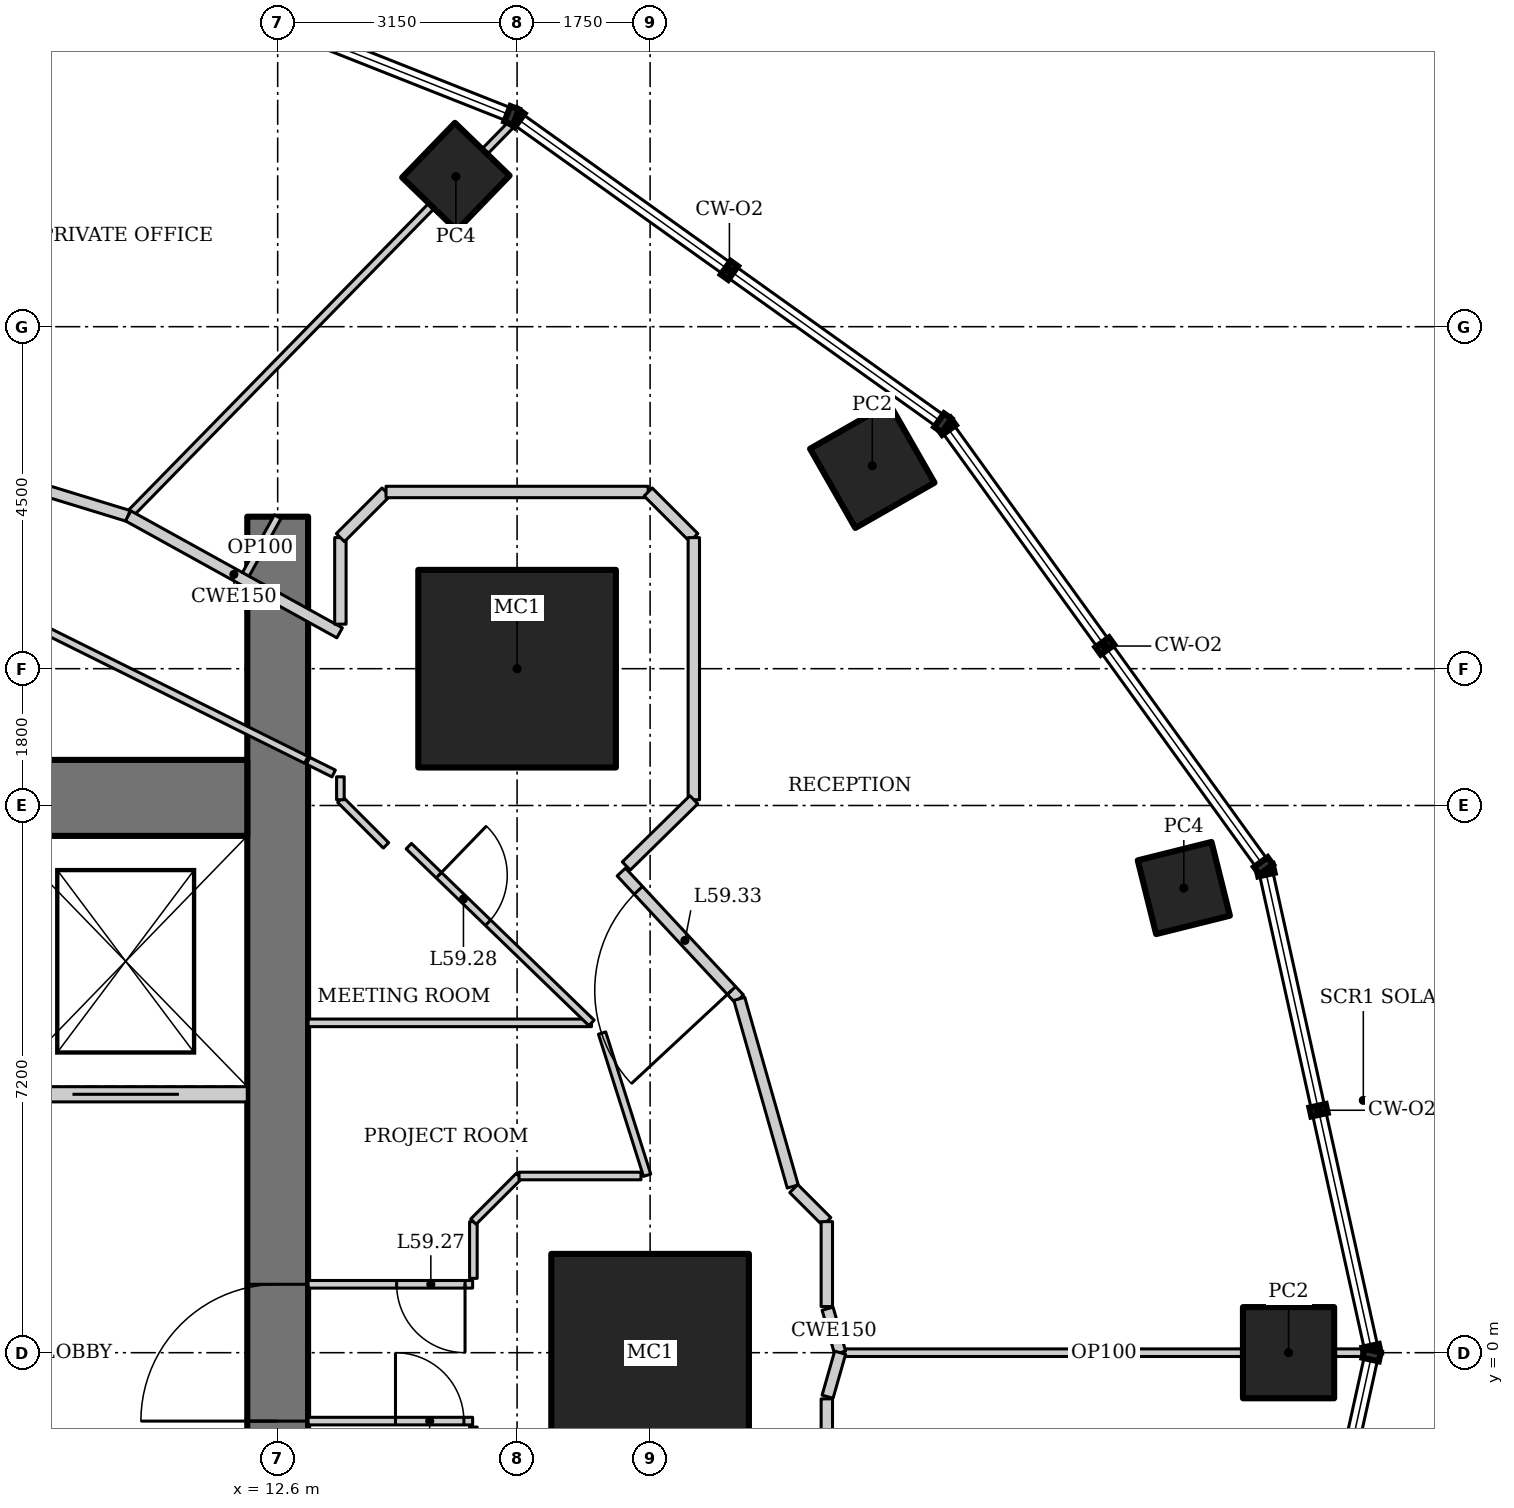
"""IFC4 building model, lengths in metres.
Left out: names, types, materials, properties, quantities, classifications, styles, units other than length and angle.
Written with IfcOpenShell. Run it as: python <this file> out.ifc"""

import sys

from ifc_helpers import new_model, si_unit, direction, frame, frame_2d, origin, origin_2d, place, context, subcontext, project, spatial, rectangle, hollow_rectangle, extrude, element, fill, save


model = new_model("IFC4")
c1 = context("Model", 3, precision=1e-05, world=origin(), true_north=direction((0.0, 1.0)))
c2 = subcontext(c1, "Body", "Model", "MODEL_VIEW")
j1 = project(units=[si_unit("LENGTHUNIT", "METRE"), si_unit("PLANEANGLEUNIT", "RADIAN")], contexts=[c1])
p1 = place(None, origin())
s1 = spatial("IfcSite", under=j1, at=p1, CompositionType="ELEMENT")
p2 = place(p1, origin())
s2 = spatial("IfcBuilding", under=s1, at=p2, CompositionType="ELEMENT")
p3 = place(p2, frame((0.0, 0.0, 253.6)))
s3 = spatial("IfcBuildingStorey", under=s2, at=p3, CompositionType="ELEMENT", Elevation=253.6)
for number, where, z_axis, x_axis in (
    (1, (17.5, 0.0, 0.0), (0.0, 0.0, 1.0), (1.0, 0.0, 0.0)),
    (2, (15.75, 9.0, 0.0), (0.0, 0.0, 1.0), (1.0, 0.0, 0.0)),
):
    element("IfcColumn", number, at=place(p3, frame(where, z_axis=z_axis, x_axis=x_axis)), inside=s3, PredefinedType="COLUMN", context=c2, shape_type="SweptSolid", body=[
        extrude(hollow_rectangle(XDim=2.6, YDim=2.6, WallThickness=0.13, at=origin_2d()), origin(), (0.0, 0.0, 1.0), 4.2),
    ])
p4 = place(p3, frame((25.9, 0.0, 0.0), z_axis=(0.0, 0.0, 1.0), x_axis=(1.0, 0.0, 0.0)))
e3 = element("IfcColumn", 3, at=p4, inside=s3, PredefinedType="COLUMN", context=c2, shape_type="SweptSolid", body=[
    extrude(hollow_rectangle(XDim=1.2, YDim=1.2, WallThickness=0.1, at=origin_2d()), origin(), (0.0, 0.0, 1.0), 4.2),
])
p5 = place(p3, frame((24.522, 6.114, 0.0), z_axis=(0.0, 0.0, 1.0), x_axis=(0.970295726276, 0.2419218956, 0.0)))
e4 = element("IfcColumn", 4, at=p5, inside=s3, PredefinedType="COLUMN", context=c2, shape_type="SweptSolid", body=[
    extrude(hollow_rectangle(XDim=1.0, YDim=1.0, WallThickness=0.08, at=origin_2d()), origin(), (0.0, 0.0, 1.0), 4.2),
])
p6 = place(p3, frame((20.423, 11.67, 0.0), z_axis=(0.0, 0.0, 1.0), x_axis=(0.86824298017, 0.496139221777, 0.0)))
e5 = element("IfcColumn", 5, at=p6, inside=s3, PredefinedType="COLUMN", context=c2, shape_type="SweptSolid", body=[
    extrude(hollow_rectangle(XDim=1.2, YDim=1.2, WallThickness=0.1, at=origin_2d()), origin(), (0.0, 0.0, 1.0), 4.2),
])
for number, where, z_axis, x_axis in (
    (6, (14.944, 15.475, 0.0), (0.0, 0.0, 1.0), (0.695, 0.719, 0.0)),
    (7, (9.035, 17.731, 0.0), (0.0, 0.0, 1.0), (0.454, 0.891, 0.0)),
):
    element("IfcColumn", number, at=place(p3, frame(where, z_axis=z_axis, x_axis=x_axis)), inside=s3, PredefinedType="COLUMN", context=c2, shape_type="SweptSolid", body=[
        extrude(hollow_rectangle(XDim=1.0, YDim=1.0, WallThickness=0.08, at=origin_2d()), origin(), (0.0, 0.0, 1.0), 4.2),
    ])
p7 = place(p3, frame((12.6, -11.0, 0.0), z_axis=(0.0, 0.0, 1.0), x_axis=(0.0, 1.0, 0.0)))
e8 = element("IfcWall", 8, at=p7, inside=s3, PredefinedType="SHEAR", context=c2, shape_type="SweptSolid", body=[
    extrude(rectangle(XDim=22.0, YDim=0.8, at=frame_2d((11.0, 0.0))), origin(), (0.0, 0.0, 1.0), 4.2),
])
p8 = place(p7, frame((10.1, 0.0, 0.0)))
e9 = element("IfcOpeningElement", 9, at=p8, cuts=e8, PredefinedType="OPENING", context=c2, shape_type="SweptSolid", body=[
    extrude(rectangle(XDim=1.8, YDim=2.1, at=frame_2d((0.9, 1.05))), frame((0.0, 0.41, 0.0), z_axis=(0.0, -1.0, 0.0), x_axis=(1.0, 0.0, 0.0)), (0.0, 0.0, 1.0), 0.82),
])
p9 = place(p3, frame((12.2, 7.3, 0.0), z_axis=(0.0, 0.0, 1.0), x_axis=(-1.0, 0.0, 0.0)))
e10 = element("IfcWall", 10, at=p9, inside=s3, PredefinedType="SHEAR", context=c2, shape_type="SweptSolid", body=[
    extrude(rectangle(XDim=6.6, YDim=1.0, at=frame_2d((3.3, 0.0))), origin(), (0.0, 0.0, 1.0), 4.2),
])
p10 = place(p3, frame((12.2, 3.4, 0.0), z_axis=(0.0, 0.0, 1.0), x_axis=(-1.0, 0.0, 0.0)))
e11 = element("IfcWall", 11, at=p10, inside=s3, PredefinedType="SOLIDWALL", context=c2, shape_type="SweptSolid", body=[
    extrude(rectangle(XDim=6.6, YDim=0.2, at=frame_2d((3.3, 0.0))), origin(), (0.0, 0.0, 1.0), 4.2),
])
p11 = place(p10, frame((4.45, 0.0, 0.0)))
e12 = element("IfcOpeningElement", 12, at=p11, cuts=e11, PredefinedType="OPENING", context=c2, shape_type="SweptSolid", body=[
    extrude(rectangle(XDim=1.1, YDim=2.2, at=frame_2d((0.55, 1.1))), frame((0.0, 0.11, 0.0), z_axis=(0.0, -1.0, 0.0), x_axis=(1.0, 0.0, 0.0)), (0.0, 0.0, 1.0), 0.22),
])
p12 = place(p10, frame((0.9, 0.0, 0.0)))
e13 = element("IfcOpeningElement", 13, at=p12, cuts=e11, PredefinedType="OPENING", context=c2, shape_type="SweptSolid", body=[
    extrude(rectangle(XDim=1.4, YDim=2.2, at=frame_2d((0.7, 1.1))), frame((0.0, 0.11, 0.0), z_axis=(0.0, -1.0, 0.0), x_axis=(1.0, 0.0, 0.0)), (0.0, 0.0, 1.0), 0.22),
])
p13 = place(p3, frame((26.944, 0.0, 0.0), z_axis=(0.0, 0.0, 1.0), x_axis=(-1.0, 0.0, 0.0)))
e14 = element("IfcWall", 14, at=p13, inside=s3, PredefinedType="PARTITIONING", context=c2, shape_type="SweptSolid", body=[
    extrude(rectangle(XDim=6.944, YDim=0.1, at=frame_2d((3.472, 0.0))), origin(), (0.0, 0.0, 1.0), 3.349),
])
p14 = place(p3, frame((15.709, 16.199, 0.0), z_axis=(0.0, 0.0, 1.0), x_axis=(-0.699362525935, -0.714767135029, 0.0)))
e15 = element("IfcWall", 15, at=p14, inside=s3, PredefinedType="PARTITIONING", context=c2, shape_type="SweptSolid", body=[
    extrude(rectangle(XDim=7.259, YDim=0.1, at=frame_2d((3.629, 0.0))), origin(), (0.0, 0.0, 1.0), 3.41),
])
p15 = place(p3, frame((10.633, 11.01, 0.0), z_axis=(0.0, 0.0, 1.0), x_axis=(-0.956185837153, 0.292760388079, 0.0)))
e16 = element("IfcWall", 16, at=p15, inside=s3, PredefinedType="PARTITIONING", context=c2, shape_type="SweptSolid", body=[
    extrude(rectangle(XDim=4.544, YDim=0.15, at=frame_2d((2.272, 0.0))), origin(), (0.0, 0.0, 1.0), 4.05),
])
p16 = place(p15, frame((3.494, 0.0, 0.0)))
e17 = element("IfcOpeningElement", 17, at=p16, cuts=e16, PredefinedType="OPENING", context=c2, shape_type="SweptSolid", body=[
    extrude(rectangle(XDim=0.9, YDim=2.1, at=frame_2d((0.45, 1.05))), frame((0.0, 0.085, 0.0), z_axis=(0.0, -1.0, 0.0), x_axis=(1.0, 0.0, 0.0)), (0.0, 0.0, 1.0), 0.17),
])
p17 = place(p3, frame((13.0, 4.34, 0.0), z_axis=(0.0, 0.0, 1.0), x_axis=(1.0, 0.0, 0.0)))
e18 = element("IfcWall", 18, at=p17, inside=s3, PredefinedType="PARTITIONING", context=c2, shape_type="SweptSolid", body=[
    extrude(rectangle(XDim=3.729, YDim=0.1, at=frame_2d((1.865, 0.0))), origin(), (0.0, 0.0, 1.0), 4.05),
])
p18 = place(p3, frame((13.0, 7.788, 0.0), z_axis=(0.0, 0.0, 1.0), x_axis=(0.895721570004, -0.444615416995, 0.0)))
e19 = element("IfcWall", 19, at=p18, inside=s3, PredefinedType="PARTITIONING", context=c2, shape_type="SweptSolid", body=[
    extrude(rectangle(XDim=0.376, YDim=0.1, at=frame_2d((0.188, 0.0))), origin(), (0.0, 0.0, 1.0), 4.05),
])
p19 = place(p3, frame((9.298, 9.628, 0.0), z_axis=(0.0, 0.0, 1.0), x_axis=(0.895529831139, -0.445001484874, 0.0)))
e20 = element("IfcWall", 20, at=p19, inside=s3, PredefinedType="PARTITIONING", context=c2, shape_type="SweptSolid", body=[
    extrude(rectangle(XDim=4.108, YDim=0.1, at=frame_2d((2.054, 0.0))), origin(), (0.0, 0.0, 1.0), 4.05),
])
p20 = place(p3, frame((12.6, 11.0, 0.0), z_axis=(0.0, 0.0, 1.0), x_axis=(-0.484103558985, -0.875010710893, 0.0)))
e21 = element("IfcWall", 21, at=p20, inside=s3, PredefinedType="PARTITIONING", context=c2, shape_type="SweptSolid", body=[
    extrude(rectangle(XDim=0.943, YDim=0.1, at=frame_2d((0.472, 0.0))), origin(), (0.0, 0.0, 1.0), 4.05),
])
p21 = place(p3, frame((18.673, 4.656, 0.0), z_axis=(0.0, 0.0, 1.0), x_axis=(-0.680985069419, 0.732297299755, 0.0)))
e22 = element("IfcWall", 22, at=p21, inside=s3, PredefinedType="PARTITIONING", context=c2, shape_type="SweptSolid", body=[
    extrude(rectangle(XDim=2.279, YDim=0.15, at=frame_2d((1.14, 0.0))), origin(), (0.0, 0.0, 1.0), 4.05),
])
p22 = place(p21, frame((0.15, 0.0, 0.0)))
e23 = element("IfcOpeningElement", 23, at=p22, cuts=e22, PredefinedType="OPENING", context=c2, shape_type="SweptSolid", body=[
    extrude(rectangle(XDim=1.8, YDim=2.1, at=frame_2d((0.9, 1.05))), frame((0.0, 0.085, 0.0), z_axis=(0.0, -1.0, 0.0), x_axis=(1.0, 0.0, 0.0)), (0.0, 0.0, 1.0), 0.17),
])
p23 = place(p3, frame((13.415, 9.472, 0.0), z_axis=(0.0, 0.0, 1.0), x_axis=(-0.875072100837, 0.483992580869, 0.0)))
e24 = element("IfcWall", 24, at=p23, inside=s3, PredefinedType="PARTITIONING", context=c2, shape_type="SweptSolid", body=[
    extrude(rectangle(XDim=3.179, YDim=0.15, at=frame_2d((1.59, 0.0))), origin(), (0.0, 0.0, 1.0), 4.05),
])
p24 = place(p3, frame((14.325, 6.665, 0.0), z_axis=(0.0, 0.0, 1.0), x_axis=(0.718798647558, -0.695218314107, 0.0)))
e25 = element("IfcWall", 25, at=p24, inside=s3, PredefinedType="PARTITIONING", context=c2, shape_type="SweptSolid", body=[
    extrude(rectangle(XDim=3.344, YDim=0.1, at=frame_2d((1.672, 0.0))), origin(), (0.0, 0.0, 1.0), 4.05),
])
p25 = place(p24, frame((0.55, 0.0, 0.0)))
e26 = element("IfcOpeningElement", 26, at=p25, cuts=e25, PredefinedType="OPENING", context=c2, shape_type="SweptSolid", body=[
    extrude(rectangle(XDim=0.9, YDim=2.1, at=frame_2d((0.45, 1.05))), frame((0.0, 0.06, 0.0), z_axis=(0.0, -1.0, 0.0), x_axis=(1.0, 0.0, 0.0)), (0.0, 0.0, 1.0), 0.12),
])
p26 = place(p3, frame((14.025, 6.675, 0.0), z_axis=(0.0, 0.0, 1.0), x_axis=(-0.707106781187, 0.707106781187, 0.0)))
e27 = element("IfcWall", 27, at=p26, inside=s3, PredefinedType="PARTITIONING", context=c2, shape_type="SweptSolid", body=[
    extrude(rectangle(XDim=0.849, YDim=0.1, at=frame_2d((0.425, 0.0))), origin(), (0.0, 0.0, 1.0), 4.05),
])
p27 = place(p3, frame((13.425, 7.275, 0.0), z_axis=(0.0, 0.0, 1.0), x_axis=(0.0, 1.0, 0.0)))
e28 = element("IfcWall", 28, at=p27, inside=s3, PredefinedType="PARTITIONING", context=c2, shape_type="SweptSolid", body=[
    extrude(rectangle(XDim=0.302, YDim=0.1, at=frame_2d((0.151, 0.0))), origin(), (0.0, 0.0, 1.0), 4.05),
])
p28 = place(p3, frame((13.425, 9.586, 0.0), z_axis=(0.0, 0.0, 1.0), x_axis=(0.0, 1.0, 0.0)))
e29 = element("IfcWall", 29, at=p28, inside=s3, PredefinedType="PARTITIONING", context=c2, shape_type="SweptSolid", body=[
    extrude(rectangle(XDim=1.138, YDim=0.15, at=frame_2d((0.569, 0.0))), origin(), (0.0, 0.0, 1.0), 4.05),
])
p29 = place(p3, frame((13.425, 10.725, 0.0), z_axis=(0.0, 0.0, 1.0), x_axis=(0.707106781187, 0.707106781187, 0.0)))
e30 = element("IfcWall", 30, at=p29, inside=s3, PredefinedType="PARTITIONING", context=c2, shape_type="SweptSolid", body=[
    extrude(rectangle(XDim=0.849, YDim=0.15, at=frame_2d((0.425, 0.0))), origin(), (0.0, 0.0, 1.0), 4.05),
])
p30 = place(p3, frame((14.025, 11.325, 0.0), z_axis=(0.0, 0.0, 1.0), x_axis=(1.0, 0.0, 0.0)))
e31 = element("IfcWall", 31, at=p30, inside=s3, PredefinedType="PARTITIONING", context=c2, shape_type="SweptSolid", body=[
    extrude(rectangle(XDim=3.449, YDim=0.15, at=frame_2d((1.725, 0.0))), origin(), (0.0, 0.0, 1.0), 4.05),
])
p31 = place(p3, frame((17.475, 11.325, 0.0), z_axis=(0.0, 0.0, 1.0), x_axis=(0.707106781187, -0.707106781187, 0.0)))
e32 = element("IfcWall", 32, at=p31, inside=s3, PredefinedType="PARTITIONING", context=c2, shape_type="SweptSolid", body=[
    extrude(rectangle(XDim=0.849, YDim=0.15, at=frame_2d((0.425, 0.0))), origin(), (0.0, 0.0, 1.0), 4.05),
])
p32 = place(p3, frame((18.075, 10.725, 0.0), z_axis=(0.0, 0.0, 1.0), x_axis=(0.0, -1.0, 0.0)))
e33 = element("IfcWall", 33, at=p32, inside=s3, PredefinedType="PARTITIONING", context=c2, shape_type="SweptSolid", body=[
    extrude(rectangle(XDim=3.449, YDim=0.15, at=frame_2d((1.725, 0.0))), origin(), (0.0, 0.0, 1.0), 3.6),
])
p33 = place(p3, frame((18.075, 7.275, 0.0), z_axis=(0.0, 0.0, 1.0), x_axis=(-0.713842064016, -0.700306723973, 0.0)))
e34 = element("IfcWall", 34, at=p33, inside=s3, PredefinedType="PARTITIONING", context=c2, shape_type="SweptSolid", body=[
    extrude(rectangle(XDim=1.245, YDim=0.15, at=frame_2d((0.622, 0.0))), origin(), (0.0, 0.0, 1.0), 4.05),
])
p34 = place(p3, frame((20.0, 0.0, 0.0), z_axis=(0.0, 0.0, 1.0), x_axis=(-0.27407847996, 0.961707329089, 0.0)))
e35 = element("IfcWall", 35, at=p34, inside=s3, PredefinedType="PARTITIONING", context=c2, shape_type="SweptSolid", body=[
    extrude(rectangle(XDim=0.602, YDim=0.15, at=frame_2d((0.301, 0.0))), origin(), (0.0, 0.0, 1.0), 4.05),
])
p35 = place(p3, frame((19.377, 2.187, 0.0), z_axis=(0.0, 0.0, 1.0), x_axis=(-0.274067949327, 0.961710330168, 0.0)))
e36 = element("IfcWall", 36, at=p35, inside=s3, PredefinedType="PARTITIONING", context=c2, shape_type="SweptSolid", body=[
    extrude(rectangle(XDim=2.567, YDim=0.15, at=frame_2d((1.284, 0.0))), origin(), (0.0, 0.0, 1.0), 4.05),
])
p36 = place(p3, frame((19.835, -0.579, 0.0), z_axis=(0.0, 0.0, 1.0), x_axis=(0.27407847996, 0.961707329089, 0.0)))
e37 = element("IfcWall", 37, at=p36, inside=s3, PredefinedType="PARTITIONING", context=c2, shape_type="SweptSolid", body=[
    extrude(rectangle(XDim=0.602, YDim=0.15, at=frame_2d((0.301, 0.0))), origin(), (0.0, 0.0, 1.0), 4.05),
])
p37 = place(p3, frame((13.0, -0.9, 0.0), z_axis=(0.0, 0.0, 1.0), x_axis=(1.0, 0.0, 0.0)))
e38 = element("IfcWall", 38, at=p37, inside=s3, PredefinedType="PARTITIONING", context=c2, shape_type="SweptSolid", body=[
    extrude(rectangle(XDim=2.165, YDim=0.1, at=frame_2d((1.083, 0.0))), origin(), (0.0, 0.0, 1.0), 4.05),
])
p38 = place(p37, frame((1.15, 0.0, 0.0)))
e39 = element("IfcOpeningElement", 39, at=p38, cuts=e38, PredefinedType="OPENING", context=c2, shape_type="SweptSolid", body=[
    extrude(rectangle(XDim=0.9, YDim=2.1, at=frame_2d((0.45, 1.05))), frame((0.0, 0.06, 0.0), z_axis=(0.0, -1.0, 0.0), x_axis=(1.0, 0.0, 0.0)), (0.0, 0.0, 1.0), 0.12),
])
p39 = place(p3, frame((16.868, 4.206, 0.0), z_axis=(0.0, 0.0, 1.0), x_axis=(0.301821975729, -0.953364303384, 0.0)))
e40 = element("IfcWall", 40, at=p39, inside=s3, PredefinedType="PARTITIONING", context=c2, shape_type="SweptSolid", body=[
    extrude(rectangle(XDim=1.962, YDim=0.1, at=frame_2d((0.981, 0.0))), origin(), (0.0, 0.0, 1.0), 4.05),
])
p40 = place(p3, frame((15.165, 0.9, 0.0), z_axis=(0.0, 0.0, 1.0), x_axis=(-1.0, 0.0, 0.0)))
e41 = element("IfcWall", 41, at=p40, inside=s3, PredefinedType="PARTITIONING", context=c2, shape_type="SweptSolid", body=[
    extrude(rectangle(XDim=2.165, YDim=0.1, at=frame_2d((1.083, 0.0))), origin(), (0.0, 0.0, 1.0), 4.05),
])
p41 = place(p40, frame((0.1, 0.0, 0.0)))
e42 = element("IfcOpeningElement", 42, at=p41, cuts=e41, PredefinedType="OPENING", context=c2, shape_type="SweptSolid", body=[
    extrude(rectangle(XDim=0.9, YDim=2.1, at=frame_2d((0.45, 1.05))), frame((0.0, 0.06, 0.0), z_axis=(0.0, -1.0, 0.0), x_axis=(1.0, 0.0, 0.0)), (0.0, 0.0, 1.0), 0.12),
])
for number, where, z_axis, x_axis in (
    (43, (15.175, -1.725, 0.0), (0.0, 0.0, 1.0), (0.0, 1.0, 0.0)),
    (44, (15.175, 0.978, 0.0), (0.0, 0.0, 1.0), (0.0, 1.0, 0.0)),
):
    element("IfcWall", number, at=place(p3, frame(where, z_axis=z_axis, x_axis=x_axis)), inside=s3, PredefinedType="PARTITIONING", context=c2, shape_type="SweptSolid", body=[
        extrude(rectangle(XDim=0.746, YDim=0.1, at=frame_2d((0.373, 0.0))), origin(), (0.0, 0.0, 1.0), 4.05),
    ])
p42 = place(p3, frame((15.175, 1.725, 0.0), z_axis=(0.0, 0.0, 1.0), x_axis=(0.707106781187, 0.707106781187, 0.0)))
e45 = element("IfcWall", 45, at=p42, inside=s3, PredefinedType="PARTITIONING", context=c2, shape_type="SweptSolid", body=[
    extrude(rectangle(XDim=0.849, YDim=0.1, at=frame_2d((0.425, 0.0))), origin(), (0.0, 0.0, 1.0), 4.05),
])
p43 = place(p3, frame((15.775, 2.325, 0.0), z_axis=(0.0, 0.0, 1.0), x_axis=(1.0, 0.0, 0.0)))
e46 = element("IfcWall", 46, at=p43, inside=s3, PredefinedType="PARTITIONING", context=c2, shape_type="SweptSolid", body=[
    extrude(rectangle(XDim=1.604, YDim=0.1, at=frame_2d((0.802, 0.0))), origin(), (0.0, 0.0, 1.0), 4.05),
])
p44 = place(p3, frame((19.39, 2.159, 0.0), z_axis=(0.0, 0.0, 1.0), x_axis=(0.707106781187, -0.707106781187, 0.0)))
e47 = element("IfcWall", 47, at=p44, inside=s3, PredefinedType="PARTITIONING", context=c2, shape_type="SweptSolid", body=[
    extrude(rectangle(XDim=0.615, YDim=0.15, at=frame_2d((0.308, 0.0))), origin(), (0.0, 0.0, 1.0), 4.05),
])
for number, where, z_axis, x_axis in (
    (48, (19.825, 1.725, 0.0), (0.0, 0.0, 1.0), (0.0, -1.0, 0.0)),
    (49, (19.825, -0.607, 0.0), (0.0, 0.0, 1.0), (0.0, -1.0, 0.0)),
):
    element("IfcWall", number, at=place(p3, frame(where, z_axis=z_axis, x_axis=x_axis)), inside=s3, PredefinedType="PARTITIONING", context=c2, shape_type="SweptSolid", body=[
        extrude(rectangle(XDim=1.117, YDim=0.15, at=frame_2d((0.559, 0.0))), origin(), (0.0, 0.0, 1.0), 4.05),
    ])
p45 = place(p8, origin())
e50 = element("IfcDoor", 50, at=p45, inside=s3, OperationType="DOUBLE_DOOR_DOUBLE_SWING", PredefinedType="DOOR", context=c2, shape_type="SweptSolid", body=[
    extrude(rectangle(XDim=1.8, YDim=2.1, at=frame_2d((0.9, 1.05))), frame((0.0, 0.025, 0.0), z_axis=(0.0, -1.0, 0.0), x_axis=(1.0, 0.0, 0.0)), (0.0, 0.0, 1.0), 0.05),
])
fill(e9, e50)
p46 = place(p12, origin())
e51 = element("IfcDoor", 51, at=p46, inside=s3, OperationType="DOUBLE_DOOR_SLIDING", PredefinedType="DOOR", context=c2, shape_type="SweptSolid", body=[
    extrude(rectangle(XDim=1.4, YDim=2.2, at=frame_2d((0.7, 1.1))), frame((0.0, 0.025, 0.0), z_axis=(0.0, -1.0, 0.0), x_axis=(1.0, 0.0, 0.0)), (0.0, 0.0, 1.0), 0.05),
])
fill(e13, e51)
p47 = place(p38, origin())
e52 = element("IfcDoor", 52, at=p47, inside=s3, OperationType="SINGLE_SWING_LEFT", PredefinedType="DOOR", context=c2, shape_type="SweptSolid", body=[
    extrude(rectangle(XDim=0.9, YDim=2.1, at=frame_2d((0.45, 1.05))), frame((0.0, 0.025, 0.0), z_axis=(0.0, -1.0, 0.0), x_axis=(1.0, 0.0, 0.0)), (0.0, 0.0, 1.0), 0.05),
])
fill(e39, e52)
p48 = place(p41, origin())
e53 = element("IfcDoor", 53, at=p48, inside=s3, OperationType="SINGLE_SWING_LEFT", PredefinedType="DOOR", context=c2, shape_type="SweptSolid", body=[
    extrude(rectangle(XDim=0.9, YDim=2.1, at=frame_2d((0.45, 1.05))), frame((0.0, 0.025, 0.0), z_axis=(0.0, -1.0, 0.0), x_axis=(1.0, 0.0, 0.0)), (0.0, 0.0, 1.0), 0.05),
])
fill(e42, e53)
p49 = place(p25, origin())
e54 = element("IfcDoor", 54, at=p49, inside=s3, OperationType="SINGLE_SWING_LEFT", PredefinedType="DOOR", context=c2, shape_type="SweptSolid", body=[
    extrude(rectangle(XDim=0.9, YDim=2.1, at=frame_2d((0.45, 1.05))), frame((0.0, 0.025, 0.0), z_axis=(0.0, -1.0, 0.0), x_axis=(1.0, 0.0, 0.0)), (0.0, 0.0, 1.0), 0.05),
])
fill(e26, e54)
p50 = place(p22, origin())
e55 = element("IfcDoor", 55, at=p50, inside=s3, OperationType="DOUBLE_DOOR_DOUBLE_SWING", PredefinedType="DOOR", context=c2, shape_type="SweptSolid", body=[
    extrude(rectangle(XDim=1.8, YDim=2.1, at=frame_2d((0.9, 1.05))), frame((0.0, 0.025, 0.0), z_axis=(0.0, -1.0, 0.0), x_axis=(1.0, 0.0, 0.0)), (0.0, 0.0, 1.0), 0.05),
])
fill(e23, e55)
save(model, sys.argv[1])
